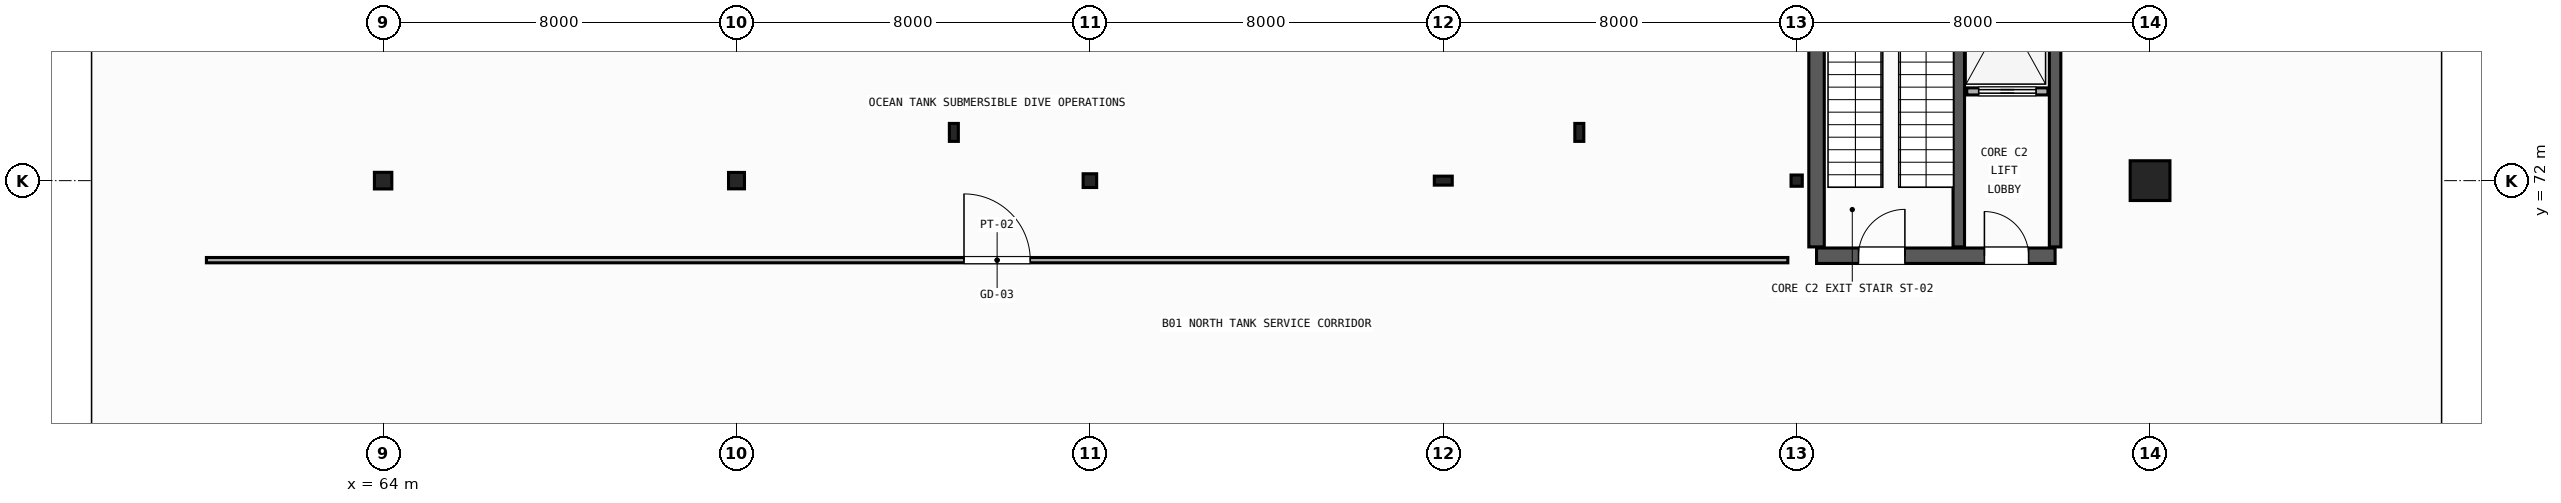
"""IFC4 building model, lengths in metres.
Left out: names, types, materials, properties, quantities, classifications, styles, units other than length and angle.
Written with IfcOpenShell. Run it as: python <this file> out.ifc"""

import sys

from ifc_helpers import new_model, si_unit, direction, frame, frame_2d, origin, origin_2d, place, context, subcontext, project, spatial, rectangle, hollow_rectangle, i_section, extrude, element, fill, save


model = new_model("IFC4")
c1 = context("Model", 3, precision=1e-05, world=origin(), true_north=direction((0.0, 1.0)))
c2 = subcontext(c1, "Body", "Model", "MODEL_VIEW")
j1 = project(units=[si_unit("LENGTHUNIT", "METRE"), si_unit("PLANEANGLEUNIT", "RADIAN")], contexts=[c1])
p1 = place(None, origin())
s1 = spatial("IfcSite", under=j1, at=p1, CompositionType="ELEMENT")
p2 = place(p1, origin())
s2 = spatial("IfcBuilding", under=s1, at=p2, CompositionType="ELEMENT")
p3 = place(p2, frame((0.0, 0.0, -5.4)))
s3 = spatial("IfcBuildingStorey", under=s2, at=p3, CompositionType="ELEMENT", Elevation=-5.4)
p4 = place(p3, frame((64.0, 72.0, 0.0), z_axis=(0.0, 0.0, 1.0), x_axis=(1.0, 0.0, 0.0)))
e1 = element("IfcColumn", 1, at=p4, inside=s3, PredefinedType="COLUMN", context=c2, shape_type="SweptSolid", body=[
    extrude(i_section(OverallWidth=0.394, OverallDepth=0.376, WebThickness=0.017, FlangeThickness=0.028, FilletRadius=0.015, at=origin_2d()), origin(), (0.0, 0.0, 1.0), 5.04),
])
p5 = place(p3, frame((72.0, 72.0, 0.0), z_axis=(0.0, 0.0, 1.0), x_axis=(0.0, 1.0, 0.0)))
e2 = element("IfcColumn", 2, at=p5, inside=s3, PredefinedType="COLUMN", context=c2, shape_type="SweptSolid", body=[
    extrude(i_section(OverallWidth=0.371, OverallDepth=0.361, WebThickness=0.012, FlangeThickness=0.02, FilletRadius=0.015, at=origin_2d()), origin(), (0.0, 0.0, 1.0), 5.04),
])
p6 = place(p3, frame((80.0, 72.0, 0.0), z_axis=(0.0, 0.0, 1.0), x_axis=(1.0, 0.0, 0.0)))
e3 = element("IfcColumn", 3, at=p6, inside=s3, PredefinedType="COLUMN", context=c2, shape_type="SweptSolid", body=[
    extrude(i_section(OverallWidth=0.306, OverallDepth=0.311, WebThickness=0.011, FlangeThickness=0.017, FilletRadius=0.013, at=origin_2d()), origin(), (0.0, 0.0, 1.0), 5.04),
])
p7 = place(p3, frame((88.0, 72.0, 0.0), z_axis=(0.0, 0.0, 1.0), x_axis=(0.0, 1.0, 0.0)))
e4 = element("IfcColumn", 4, at=p7, inside=s3, PredefinedType="COLUMN", context=c2, shape_type="SweptSolid", body=[
    extrude(hollow_rectangle(XDim=0.203, YDim=0.406, WallThickness=0.012, InnerFilletRadius=0.012, OuterFilletRadius=0.024, at=origin_2d()), origin(), (0.0, 0.0, 1.0), 5.04),
])
p8 = place(p3, frame((96.0, 72.0, 0.0), z_axis=(0.0, 0.0, 1.0), x_axis=(1.0, 0.0, 0.0)))
e5 = element("IfcColumn", 5, at=p8, inside=s3, PredefinedType="COLUMN", context=c2, shape_type="SweptSolid", body=[
    extrude(hollow_rectangle(XDim=0.254, YDim=0.254, WallThickness=0.012, InnerFilletRadius=0.012, OuterFilletRadius=0.024, at=origin_2d()), origin(), (0.0, 0.0, 1.0), 5.04),
])
p9 = place(p3, frame((104.0, 72.0, 0.0), z_axis=(0.0, 0.0, 1.0), x_axis=(0.0, 1.0, 0.0)))
e6 = element("IfcColumn", 6, at=p9, inside=s3, PredefinedType="COLUMN", context=c2, shape_type="SweptSolid", body=[
    extrude(rectangle(XDim=0.9, YDim=0.9, at=origin_2d()), origin(), (0.0, 0.0, 1.0), 5.04),
])
for number, where, z_axis, x_axis in (
    (7, (91.08, 73.092, 0.0), (0.0, 0.0, 1.0), (1.0, 0.0, 0.0)),
    (8, (76.92, 73.092, 0.0), (0.0, 0.0, 1.0), (1.0, 0.0, 0.0)),
):
    element("IfcColumn", number, at=place(p3, frame(where, z_axis=z_axis, x_axis=x_axis)), inside=s3, PredefinedType="COLUMN", context=c2, shape_type="SweptSolid", body=[
        extrude(hollow_rectangle(XDim=0.203, YDim=0.406, WallThickness=0.012, InnerFilletRadius=0.012, OuterFilletRadius=0.024, at=origin_2d()), origin(), (0.0, 0.0, 1.0), 5.02),
    ])
p10 = place(p3, frame((96.45, 70.3, 0.0), z_axis=(0.0, 0.0, 1.0), x_axis=(1.0, 0.0, 0.0)))
e9 = element("IfcWall", 9, at=p10, inside=s3, PredefinedType="SHEAR", context=c2, shape_type="SweptSolid", body=[
    extrude(rectangle(XDim=5.4, YDim=0.35, at=frame_2d((2.7, 0.0))), origin(), (0.0, 0.0, 1.0), 5.03),
])
p11 = place(p10, frame((0.95, 0.0, 0.0)))
e10 = element("IfcOpeningElement", 10, at=p11, cuts=e9, PredefinedType="OPENING", context=c2, shape_type="SweptSolid", body=[
    extrude(rectangle(XDim=1.05, YDim=2.1, at=frame_2d((0.525, 1.05))), frame((0.0, 0.185, 0.0), z_axis=(0.0, -1.0, 0.0), x_axis=(1.0, 0.0, 0.0)), (0.0, 0.0, 1.0), 0.37),
])
p12 = place(p10, frame((3.8, 0.0, 0.0)))
e11 = element("IfcOpeningElement", 11, at=p12, cuts=e9, PredefinedType="OPENING", context=c2, shape_type="SweptSolid", body=[
    extrude(rectangle(XDim=1.0, YDim=2.15, at=frame_2d((0.5, 1.075))), frame((0.0, 0.185, 0.0), z_axis=(0.0, -1.0, 0.0), x_axis=(1.0, 0.0, 0.0)), (0.0, 0.0, 1.0), 0.37),
])
p13 = place(p3, frame((96.45, 70.5, 0.0), z_axis=(0.0, 0.0, 1.0), x_axis=(0.0, 1.0, 0.0)))
e12 = element("IfcWall", 12, at=p13, inside=s3, PredefinedType="SHEAR", context=c2, shape_type="SweptSolid", body=[
    extrude(rectangle(XDim=6.95, YDim=0.35, at=frame_2d((3.475, 0.0))), origin(), (0.0, 0.0, 1.0), 5.03),
])
for number, where, z_axis, x_axis in (
    (13, (101.85, 70.5, 0.0), (0.0, 0.0, 1.0), (0.0, 1.0, 0.0)),
    (14, (99.67, 70.5, 0.0), (0.0, 0.0, 1.0), (0.0, 1.0, 0.0)),
):
    element("IfcWall", number, at=place(p3, frame(where, z_axis=z_axis, x_axis=x_axis)), inside=s3, PredefinedType="SHEAR", context=c2, shape_type="SweptSolid", body=[
        extrude(rectangle(XDim=6.95, YDim=0.26, at=frame_2d((3.475, 0.0))), origin(), (0.0, 0.0, 1.0), 5.03),
    ])
p14 = place(p3, frame((99.85, 74.02, 0.0), z_axis=(0.0, 0.0, 1.0), x_axis=(1.0, 0.0, 0.0)))
e15 = element("IfcWall", 15, at=p14, inside=s3, PredefinedType="PARTITIONING", context=c2, shape_type="SweptSolid", body=[
    extrude(rectangle(XDim=1.84, YDim=0.16, at=frame_2d((0.92, 0.0))), origin(), (0.0, 0.0, 1.0), 3.6),
])
p15 = place(p14, frame((0.27, 0.0, 0.0)))
e16 = element("IfcOpeningElement", 16, at=p15, cuts=e15, PredefinedType="OPENING", context=c2, shape_type="SweptSolid", body=[
    extrude(rectangle(XDim=1.3, YDim=2.2, at=frame_2d((0.65, 1.1))), frame((0.0, 0.09, 0.0), z_axis=(0.0, -1.0, 0.0), x_axis=(1.0, 0.0, 0.0)), (0.0, 0.0, 1.0), 0.18),
])
p16 = place(p3, frame((60.0, 70.2, 0.0), z_axis=(0.0, 0.0, 1.0), x_axis=(1.0, 0.0, 0.0)))
e17 = element("IfcWall", 17, at=p16, inside=s3, PredefinedType="PARTITIONING", context=c2, shape_type="SweptSolid", body=[
    extrude(rectangle(XDim=35.8, YDim=0.12, at=frame_2d((17.9, 0.0))), origin(), (0.0, 0.0, 1.0), 4.238),
])
p17 = place(p16, frame((17.15, 0.0, 0.0)))
e18 = element("IfcOpeningElement", 18, at=p17, cuts=e17, PredefinedType="OPENING", context=c2, shape_type="SweptSolid", body=[
    extrude(rectangle(XDim=1.5, YDim=2.3, at=frame_2d((0.75, 1.15))), frame((0.0, 0.07, 0.0), z_axis=(0.0, -1.0, 0.0), x_axis=(1.0, 0.0, 0.0)), (0.0, 0.0, 1.0), 0.14),
])
p18 = place(p15, origin())
e19 = element("IfcDoor", 19, at=p18, inside=s3, OperationType="SLIDING_TO_LEFT", PredefinedType="DOOR", context=c2, shape_type="SweptSolid", body=[
    extrude(rectangle(XDim=1.3, YDim=2.2, at=frame_2d((0.65, 1.1))), frame((0.0, 0.025, 0.0), z_axis=(0.0, -1.0, 0.0), x_axis=(1.0, 0.0, 0.0)), (0.0, 0.0, 1.0), 0.05),
])
fill(e16, e19)
p19 = place(p11, origin())
e20 = element("IfcDoor", 20, at=p19, inside=s3, OperationType="SINGLE_SWING_RIGHT", PredefinedType="DOOR", context=c2, shape_type="SweptSolid", body=[
    extrude(rectangle(XDim=1.05, YDim=2.1, at=frame_2d((0.525, 1.05))), frame((0.0, 0.025, 0.0), z_axis=(0.0, -1.0, 0.0), x_axis=(1.0, 0.0, 0.0)), (0.0, 0.0, 1.0), 0.05),
])
fill(e10, e20)
p20 = place(p12, origin())
e21 = element("IfcDoor", 21, at=p20, inside=s3, OperationType="SINGLE_SWING_LEFT", PredefinedType="DOOR", context=c2, shape_type="SweptSolid", body=[
    extrude(rectangle(XDim=1.0, YDim=2.15, at=frame_2d((0.5, 1.075))), frame((0.0, 0.025, 0.0), z_axis=(0.0, -1.0, 0.0), x_axis=(1.0, 0.0, 0.0)), (0.0, 0.0, 1.0), 0.05),
])
fill(e11, e21)
p21 = place(p17, origin())
e22 = element("IfcDoor", 22, at=p21, inside=s3, OperationType="SINGLE_SWING_LEFT", PredefinedType="DOOR", context=c2, shape_type="SweptSolid", body=[
    extrude(rectangle(XDim=1.5, YDim=2.3, at=frame_2d((0.75, 1.15))), frame((0.0, 0.025, 0.0), z_axis=(0.0, -1.0, 0.0), x_axis=(1.0, 0.0, 0.0)), (0.0, 0.0, 1.0), 0.05),
])
fill(e18, e22)
save(model, sys.argv[1])
